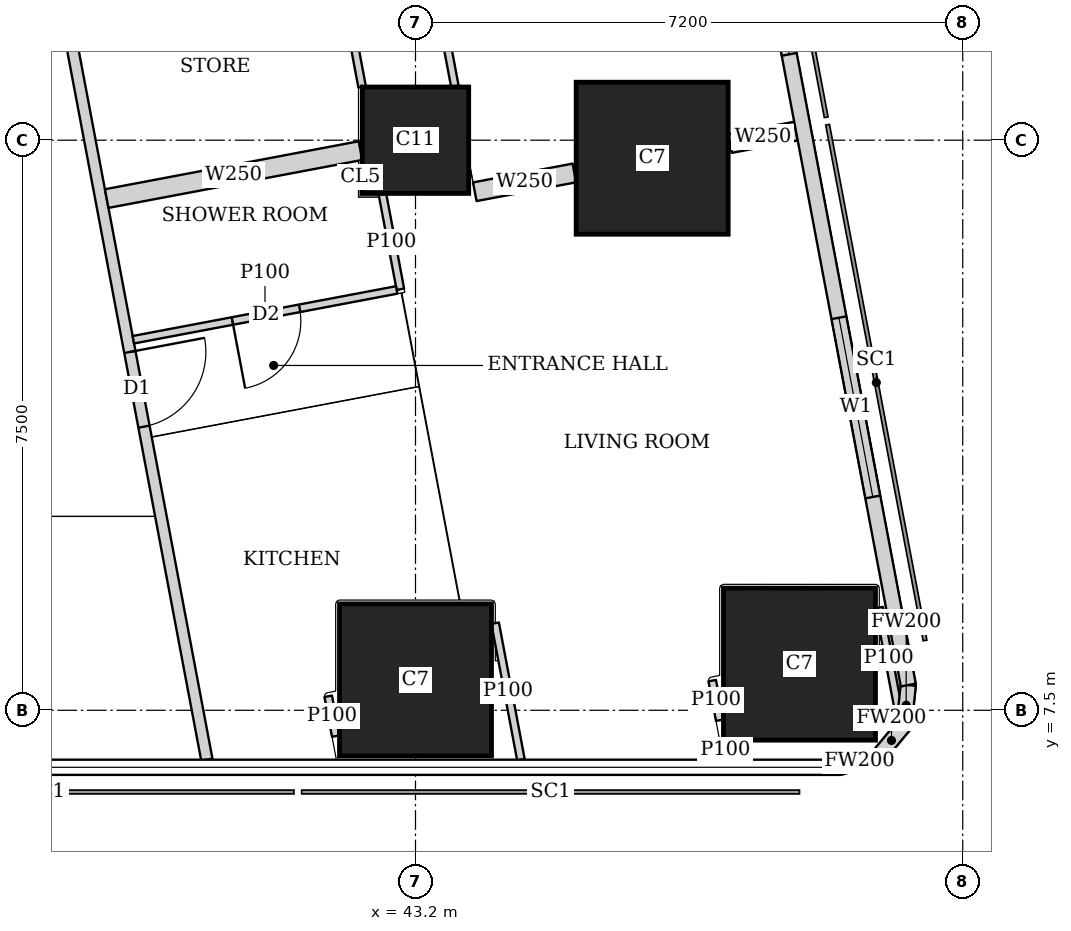
"""IFC4 building model, lengths in metres.
Left out: names, types, materials, properties, quantities, classifications, styles, units other than length and angle.
Written with IfcOpenShell. Run it as: python <this file> out.ifc"""

import sys

from ifc_helpers import new_model, si_unit, direction, frame, frame_2d, origin, origin_2d, place, context, subcontext, project, spatial, rectangle, extrude, element, fill, save


model = new_model("IFC4")
c1 = context("Model", 3, precision=1e-05, world=origin(), true_north=direction((0.0, 1.0)))
c2 = subcontext(c1, "Body", "Model", "MODEL_VIEW")
j1 = project(units=[si_unit("LENGTHUNIT", "METRE"), si_unit("PLANEANGLEUNIT", "RADIAN")], contexts=[c1])
p1 = place(None, origin())
s1 = spatial("IfcSite", under=j1, at=p1, CompositionType="ELEMENT")
p2 = place(p1, origin())
s2 = spatial("IfcBuilding", under=s1, at=p2, CompositionType="ELEMENT")
p3 = place(p2, frame((0.0, 0.0, 255.35)))
s3 = spatial("IfcBuildingStorey", under=s2, at=p3, CompositionType="ELEMENT", Elevation=255.35)
for number, where, z_axis, x_axis in (
    (1, (43.2, 7.9, 0.0), (0.0, 0.0, 1.0), (1.0, 0.0, 0.0)),
    (2, (48.252, 8.107, 0.0), (0.0, 0.0, 1.0), (1.0, 0.0, 0.0)),
):
    element("IfcColumn", number, at=place(p3, frame(where, z_axis=z_axis, x_axis=x_axis)), inside=s3, PredefinedType="COLUMN", context=c2, shape_type="SweptSolid", body=[
        extrude(rectangle(XDim=2.0, YDim=2.0, at=origin_2d()), origin(), (0.0, 0.0, 1.0), 3.75),
    ])
p4 = place(p3, frame((43.2, 15.0, 0.0), z_axis=(0.0, 0.0, 1.0), x_axis=(1.0, 0.0, 0.0)))
e3 = element("IfcColumn", 3, at=p4, inside=s3, PredefinedType="COLUMN", context=c2, shape_type="SweptSolid", body=[
    extrude(rectangle(XDim=1.4, YDim=1.4, at=origin_2d()), origin(), (0.0, 0.0, 1.0), 3.75),
])
p5 = place(p3, frame((46.314, 14.763, 0.0), z_axis=(0.0, 0.0, 1.0), x_axis=(1.0, 0.0, 0.0)))
e4 = element("IfcColumn", 4, at=p5, inside=s3, PredefinedType="COLUMN", context=c2, shape_type="SweptSolid", body=[
    extrude(rectangle(XDim=2.0, YDim=2.0, at=origin_2d()), origin(), (0.0, 0.0, 1.0), 3.75),
])
p6 = place(p3, frame((48.787, 6.75, 0.0), z_axis=(0.0, 0.0, 1.0), x_axis=(0.957282247819, 0.289155145225, 0.0)))
e5 = element("IfcWall", 5, at=p6, inside=s3, PredefinedType="SOLIDWALL", context=c2, shape_type="SweptSolid", body=[
    extrude(rectangle(XDim=0.533, YDim=0.2, at=frame_2d((0.266, 0.0))), origin(), (0.0, 0.0, 1.0), 3.5),
])
p7 = place(p3, frame((49.297, 6.904, 0.0), z_axis=(0.0, 0.0, 1.0), x_axis=(0.639255849474, 0.768994121508, 0.0)))
e6 = element("IfcWall", 6, at=p7, inside=s3, PredefinedType="SOLIDWALL", context=c2, shape_type="SweptSolid", body=[
    extrude(rectangle(XDim=0.518, YDim=0.2, at=frame_2d((0.259, 0.0))), origin(), (0.0, 0.0, 1.0), 3.5),
])
p8 = place(p3, frame((49.628, 7.302, 0.0), z_axis=(0.0, 0.0, 1.0), x_axis=(0.105352390132, 0.994434952068, 0.0)))
e7 = element("IfcWall", 7, at=p8, inside=s3, PredefinedType="SOLIDWALL", context=c2, shape_type="SweptSolid", body=[
    extrude(rectangle(XDim=0.533, YDim=0.2, at=frame_2d((0.267, 0.0))), origin(), (0.0, 0.0, 1.0), 3.5),
])
p9 = place(p3, frame((49.684, 7.832, 0.0), z_axis=(0.0, 0.0, 1.0), x_axis=(-0.185616669694, 0.982622232565, 0.0)))
e8 = element("IfcWall", 8, at=p9, inside=s3, PredefinedType="SOLIDWALL", context=c2, shape_type="SweptSolid", body=[
    extrude(rectangle(XDim=36.0, YDim=0.2, at=frame_2d((18.0, 0.0))), origin(), (0.0, 0.0, 1.0), 3.5),
])
p10 = place(p9, frame((2.518, 0.0, 0.9)))
e9 = element("IfcOpeningElement", 9, at=p10, cuts=e8, PredefinedType="OPENING", context=c2, shape_type="SweptSolid", body=[
    extrude(rectangle(XDim=2.4, YDim=1.5, at=frame_2d((1.2, 0.75))), frame((0.0, 0.11, 0.0), z_axis=(0.0, -1.0, 0.0), x_axis=(1.0, 0.0, 0.0)), (0.0, 0.0, 1.0), 0.22),
])
p11 = place(p9, frame((8.444, 0.0, 0.9)))
e10 = element("IfcOpeningElement", 10, at=p11, cuts=e8, PredefinedType="OPENING", context=c2, shape_type="SweptSolid", body=[
    extrude(rectangle(XDim=1.8, YDim=1.5, at=frame_2d((0.9, 0.75))), frame((0.0, 0.11, 0.0), z_axis=(0.0, -1.0, 0.0), x_axis=(1.0, 0.0, 0.0)), (0.0, 0.0, 1.0), 0.22),
])
p12 = place(p9, frame((12.261, 0.0, 0.9)))
e11 = element("IfcOpeningElement", 11, at=p12, cuts=e8, PredefinedType="OPENING", context=c2, shape_type="SweptSolid", body=[
    extrude(rectangle(XDim=1.8, YDim=1.5, at=frame_2d((0.9, 0.75))), frame((0.0, 0.11, 0.0), z_axis=(0.0, -1.0, 0.0), x_axis=(1.0, 0.0, 0.0)), (0.0, 0.0, 1.0), 0.22),
])
p13 = place(p9, frame((16.078, 0.0, 0.9)))
e12 = element("IfcOpeningElement", 12, at=p13, cuts=e8, PredefinedType="OPENING", context=c2, shape_type="SweptSolid", body=[
    extrude(rectangle(XDim=1.8, YDim=1.5, at=frame_2d((0.9, 0.75))), frame((0.0, 0.11, 0.0), z_axis=(0.0, -1.0, 0.0), x_axis=(1.0, 0.0, 0.0)), (0.0, 0.0, 1.0), 0.22),
])
p14 = place(p9, frame((19.894, 0.0, 0.9)))
e13 = element("IfcOpeningElement", 13, at=p14, cuts=e8, PredefinedType="OPENING", context=c2, shape_type="SweptSolid", body=[
    extrude(rectangle(XDim=1.8, YDim=1.5, at=frame_2d((0.9, 0.75))), frame((0.0, 0.11, 0.0), z_axis=(0.0, -1.0, 0.0), x_axis=(1.0, 0.0, 0.0)), (0.0, 0.0, 1.0), 0.22),
])
p15 = place(p9, frame((23.71, 0.0, 0.9)))
e14 = element("IfcOpeningElement", 14, at=p15, cuts=e8, PredefinedType="OPENING", context=c2, shape_type="SweptSolid", body=[
    extrude(rectangle(XDim=1.8, YDim=1.5, at=frame_2d((0.9, 0.75))), frame((0.0, 0.11, 0.0), z_axis=(0.0, -1.0, 0.0), x_axis=(1.0, 0.0, 0.0)), (0.0, 0.0, 1.0), 0.22),
])
p16 = place(p9, frame((27.526, 0.0, 0.9)))
e15 = element("IfcOpeningElement", 15, at=p16, cuts=e8, PredefinedType="OPENING", context=c2, shape_type="SweptSolid", body=[
    extrude(rectangle(XDim=1.8, YDim=1.5, at=frame_2d((0.9, 0.75))), frame((0.0, 0.11, 0.0), z_axis=(0.0, -1.0, 0.0), x_axis=(1.0, 0.0, 0.0)), (0.0, 0.0, 1.0), 0.22),
])
p17 = place(p9, frame((32.046, 0.0, 0.9)))
e16 = element("IfcOpeningElement", 16, at=p17, cuts=e8, PredefinedType="OPENING", context=c2, shape_type="SweptSolid", body=[
    extrude(rectangle(XDim=1.8, YDim=1.5, at=frame_2d((0.9, 0.75))), frame((0.0, 0.11, 0.0), z_axis=(0.0, -1.0, 0.0), x_axis=(1.0, 0.0, 0.0)), (0.0, 0.0, 1.0), 0.22),
])
p18 = place(p3, frame((33.781, 42.186, 0.0), z_axis=(0.0, 0.0, 1.0), x_axis=(0.185593518645, -0.9826266055, 0.0)))
e17 = element("IfcWall", 17, at=p18, inside=s3, PredefinedType="SOLIDWALL", context=c2, shape_type="SweptSolid", body=[
    extrude(rectangle(XDim=35.961, YDim=0.15, at=frame_2d((17.98, 0.0))), origin(), (0.0, 0.0, 1.0), 2.5),
])
p19 = place(p18, frame((7.183, 0.0, 0.0)))
e18 = element("IfcOpeningElement", 18, at=p19, cuts=e17, PredefinedType="OPENING", context=c2, shape_type="SweptSolid", body=[
    extrude(rectangle(XDim=1.0, YDim=2.1, at=frame_2d((0.5, 1.05))), frame((0.0, 0.085, 0.0), z_axis=(0.0, -1.0, 0.0), x_axis=(1.0, 0.0, 0.0)), (0.0, 0.0, 1.0), 0.17),
])
p20 = place(p18, frame((11.76, 0.0, 0.0)))
e19 = element("IfcOpeningElement", 19, at=p20, cuts=e17, PredefinedType="OPENING", context=c2, shape_type="SweptSolid", body=[
    extrude(rectangle(XDim=1.0, YDim=2.1, at=frame_2d((0.5, 1.05))), frame((0.0, 0.085, 0.0), z_axis=(0.0, -1.0, 0.0), x_axis=(1.0, 0.0, 0.0)), (0.0, 0.0, 1.0), 0.17),
])
p21 = place(p18, frame((23.863, 0.0, 0.0)))
e20 = element("IfcOpeningElement", 20, at=p21, cuts=e17, PredefinedType="OPENING", context=c2, shape_type="SweptSolid", body=[
    extrude(rectangle(XDim=1.0, YDim=2.1, at=frame_2d((0.5, 1.05))), frame((0.0, 0.085, 0.0), z_axis=(0.0, -1.0, 0.0), x_axis=(1.0, 0.0, 0.0)), (0.0, 0.0, 1.0), 0.17),
])
p22 = place(p18, frame((30.502, 0.0, 0.0)))
e21 = element("IfcOpeningElement", 21, at=p22, cuts=e17, PredefinedType="OPENING", context=c2, shape_type="SweptSolid", body=[
    extrude(rectangle(XDim=1.0, YDim=2.1, at=frame_2d((0.5, 1.05))), frame((0.0, 0.085, 0.0), z_axis=(0.0, -1.0, 0.0), x_axis=(1.0, 0.0, 0.0)), (0.0, 0.0, 1.0), 0.17),
])
p23 = place(p3, frame((44.248, 8.646, 0.0), z_axis=(0.0, 0.0, 1.0), x_axis=(0.185417594585, -0.982659816833, 0.0)))
e22 = element("IfcWall", 22, at=p23, inside=s3, PredefinedType="PARTITIONING", context=c2, shape_type="SweptSolid", body=[
    extrude(rectangle(XDim=1.828, YDim=0.1, at=frame_2d((0.914, 0.0))), origin(), (0.0, 0.0, 1.0), 2.05),
])
p24 = place(p3, frame((42.151, 7.16, 0.0), z_axis=(0.0, 0.0, 1.0), x_axis=(-0.185366164644, 0.982669519729, 0.0)))
e23 = element("IfcWall", 23, at=p24, inside=s3, PredefinedType="PARTITIONING", context=c2, shape_type="SweptSolid", body=[
    extrude(rectangle(XDim=0.533, YDim=0.1, at=frame_2d((0.267, 0.0))), origin(), (0.0, 0.0, 1.0), 2.5),
])
p25 = place(p3, frame((49.3, 8.851, 0.0), z_axis=(0.0, 0.0, 1.0), x_axis=(0.18581620423, -0.982584519645, 0.0)))
e24 = element("IfcWall", 24, at=p25, inside=s3, PredefinedType="PARTITIONING", context=c2, shape_type="SweptSolid", body=[
    extrude(rectangle(XDim=1.351, YDim=0.1, at=frame_2d((0.675, 0.0))), origin(), (0.0, 0.0, 1.0), 3.5),
])
p26 = place(p3, frame((47.301, 6.85, 0.0), z_axis=(0.0, 0.0, 1.0), x_axis=(-0.187513903188, 0.982261948826, 0.0)))
e25 = element("IfcWall", 25, at=p26, inside=s3, PredefinedType="PARTITIONING", context=c2, shape_type="SweptSolid", body=[
    extrude(rectangle(XDim=0.251, YDim=0.1, at=frame_2d((0.125, 0.0))), origin(), (0.0, 0.0, 1.0), 3.5),
])
p27 = place(p3, frame((47.203, 7.369, 0.0), z_axis=(0.0, 0.0, 1.0), x_axis=(-0.186456243114, 0.982463266185, 0.0)))
e26 = element("IfcWall", 26, at=p27, inside=s3, PredefinedType="PARTITIONING", context=c2, shape_type="SweptSolid", body=[
    extrude(rectangle(XDim=0.53, YDim=0.1, at=frame_2d((0.265, 0.0))), origin(), (0.0, 0.0, 1.0), 2.05),
])
p28 = place(p3, frame((43.311, 17.865, 0.0), z_axis=(0.0, 0.0, 1.0), x_axis=(0.185572140257, -0.982630643101, 0.0)))
e27 = element("IfcWall", 27, at=p28, inside=s3, PredefinedType="PARTITIONING", context=c2, shape_type="SweptSolid", body=[
    extrude(rectangle(XDim=2.193, YDim=0.1, at=frame_2d((1.097, 0.0))), origin(), (0.0, 0.0, 1.0), 3.5),
])
p29 = place(p28, frame((0.15, 0.0, 0.0)))
e28 = element("IfcOpeningElement", 28, at=p29, cuts=e27, PredefinedType="OPENING", context=c2, shape_type="SweptSolid", body=[
    extrude(rectangle(XDim=0.9, YDim=2.1, at=frame_2d((0.45, 1.05))), frame((0.0, 0.06, 0.0), z_axis=(0.0, -1.0, 0.0), x_axis=(1.0, 0.0, 0.0)), (0.0, 0.0, 1.0), 0.12),
])
p30 = place(p3, frame((42.123, 17.691, 0.0), z_axis=(0.0, 0.0, 1.0), x_axis=(0.185183804812, -0.98270390171, 0.0)))
e29 = element("IfcWall", 29, at=p30, inside=s3, PredefinedType="PARTITIONING", context=c2, shape_type="SweptSolid", body=[
    extrude(rectangle(XDim=2.025, YDim=0.1, at=frame_2d((1.012, 0.0))), origin(), (0.0, 0.0, 1.0), 3.5),
])
p31 = place(p3, frame((42.765, 14.29, 0.0), z_axis=(0.0, 0.0, 1.0), x_axis=(0.185446293138, -0.982654401283, 0.0)))
e30 = element("IfcWall", 30, at=p31, inside=s3, PredefinedType="PARTITIONING", context=c2, shape_type="SweptSolid", body=[
    extrude(rectangle(XDim=1.273, YDim=0.1, at=frame_2d((0.636, 0.0))), origin(), (0.0, 0.0, 1.0), 3.5),
])
p32 = place(p3, frame((42.952, 13.03, 0.0), z_axis=(0.0, 0.0, 1.0), x_axis=(-0.982585626838, -0.185810349366, 0.0)))
e31 = element("IfcWall", 31, at=p32, inside=s3, PredefinedType="PARTITIONING", context=c2, shape_type="SweptSolid", body=[
    extrude(rectangle(XDim=3.525, YDim=0.1, at=frame_2d((1.763, 0.0))), origin(), (0.0, 0.0, 1.0), 3.5),
])
p33 = place(p32, frame((1.299, 0.0, 0.0)))
e32 = element("IfcOpeningElement", 32, at=p33, cuts=e31, PredefinedType="OPENING", context=c2, shape_type="SweptSolid", body=[
    extrude(rectangle(XDim=0.9, YDim=2.1, at=frame_2d((0.45, 1.05))), frame((0.0, 0.06, 0.0), z_axis=(0.0, -1.0, 0.0), x_axis=(1.0, 0.0, 0.0)), (0.0, 0.0, 1.0), 0.12),
])
p34 = place(p3, frame((48.206, 15.12, 0.0), z_axis=(0.0, 0.0, 1.0), x_axis=(-0.982608419258, -0.185689780017, 0.0)))
e33 = element("IfcWall", 33, at=p34, inside=s3, PredefinedType="SOLIDWALL", context=c2, shape_type="SweptSolid", body=[
    extrude(rectangle(XDim=0.884, YDim=0.25, at=frame_2d((0.442, 0.0))), origin(), (0.0, 0.0, 1.0), 3.5),
])
p35 = place(p3, frame((45.29, 14.569, 0.0), z_axis=(0.0, 0.0, 1.0), x_axis=(-0.982676759201, -0.185327782391, 0.0)))
e34 = element("IfcWall", 34, at=p35, inside=s3, PredefinedType="SOLIDWALL", context=c2, shape_type="SweptSolid", body=[
    extrude(rectangle(XDim=1.333, YDim=0.25, at=frame_2d((0.667, 0.0))), origin(), (0.0, 0.0, 1.0), 3.5),
])
p36 = place(p3, frame((42.476, 14.863, 0.0), z_axis=(0.0, 0.0, 1.0), x_axis=(-0.982603567712, -0.185715450942, 0.0)))
e35 = element("IfcWall", 35, at=p36, inside=s3, PredefinedType="SOLIDWALL", context=c2, shape_type="SweptSolid", body=[
    extrude(rectangle(XDim=3.398, YDim=0.25, at=frame_2d((1.699, 0.0))), origin(), (0.0, 0.0, 1.0), 3.5),
])
p37 = place(p10, origin())
e36 = element("IfcWindow", 36, at=p37, inside=s3, PartitioningType="SINGLE_PANEL", PredefinedType="WINDOW", context=c2, shape_type="SweptSolid", body=[
    extrude(rectangle(XDim=2.4, YDim=1.5, at=frame_2d((1.2, 0.75))), frame((0.0, 0.03, 0.0), z_axis=(0.0, -1.0, 0.0), x_axis=(1.0, 0.0, 0.0)), (0.0, 0.0, 1.0), 0.06),
])
fill(e9, e36)
p38 = place(p11, origin())
e37 = element("IfcWindow", 37, at=p38, inside=s3, PartitioningType="SINGLE_PANEL", PredefinedType="WINDOW", context=c2, shape_type="SweptSolid", body=[
    extrude(rectangle(XDim=1.8, YDim=1.5, at=frame_2d((0.9, 0.75))), frame((0.0, 0.03, 0.0), z_axis=(0.0, -1.0, 0.0), x_axis=(1.0, 0.0, 0.0)), (0.0, 0.0, 1.0), 0.06),
])
fill(e10, e37)
p39 = place(p33, origin())
e38 = element("IfcDoor", 38, at=p39, inside=s3, OperationType="SINGLE_SWING_RIGHT", PredefinedType="DOOR", context=c2, shape_type="SweptSolid", body=[
    extrude(rectangle(XDim=0.9, YDim=2.1, at=frame_2d((0.45, 1.05))), frame((0.0, 0.025, 0.0), z_axis=(0.0, -1.0, 0.0), x_axis=(1.0, 0.0, 0.0)), (0.0, 0.0, 1.0), 0.05),
])
fill(e32, e38)
p40 = place(p22, origin())
e39 = element("IfcDoor", 39, at=p40, inside=s3, OperationType="SINGLE_SWING_LEFT", PredefinedType="DOOR", context=c2, shape_type="SweptSolid", body=[
    extrude(rectangle(XDim=1.0, YDim=2.1, at=frame_2d((0.5, 1.05))), frame((0.0, 0.025, 0.0), z_axis=(0.0, -1.0, 0.0), x_axis=(1.0, 0.0, 0.0)), (0.0, 0.0, 1.0), 0.05),
])
fill(e21, e39)
save(model, sys.argv[1])
